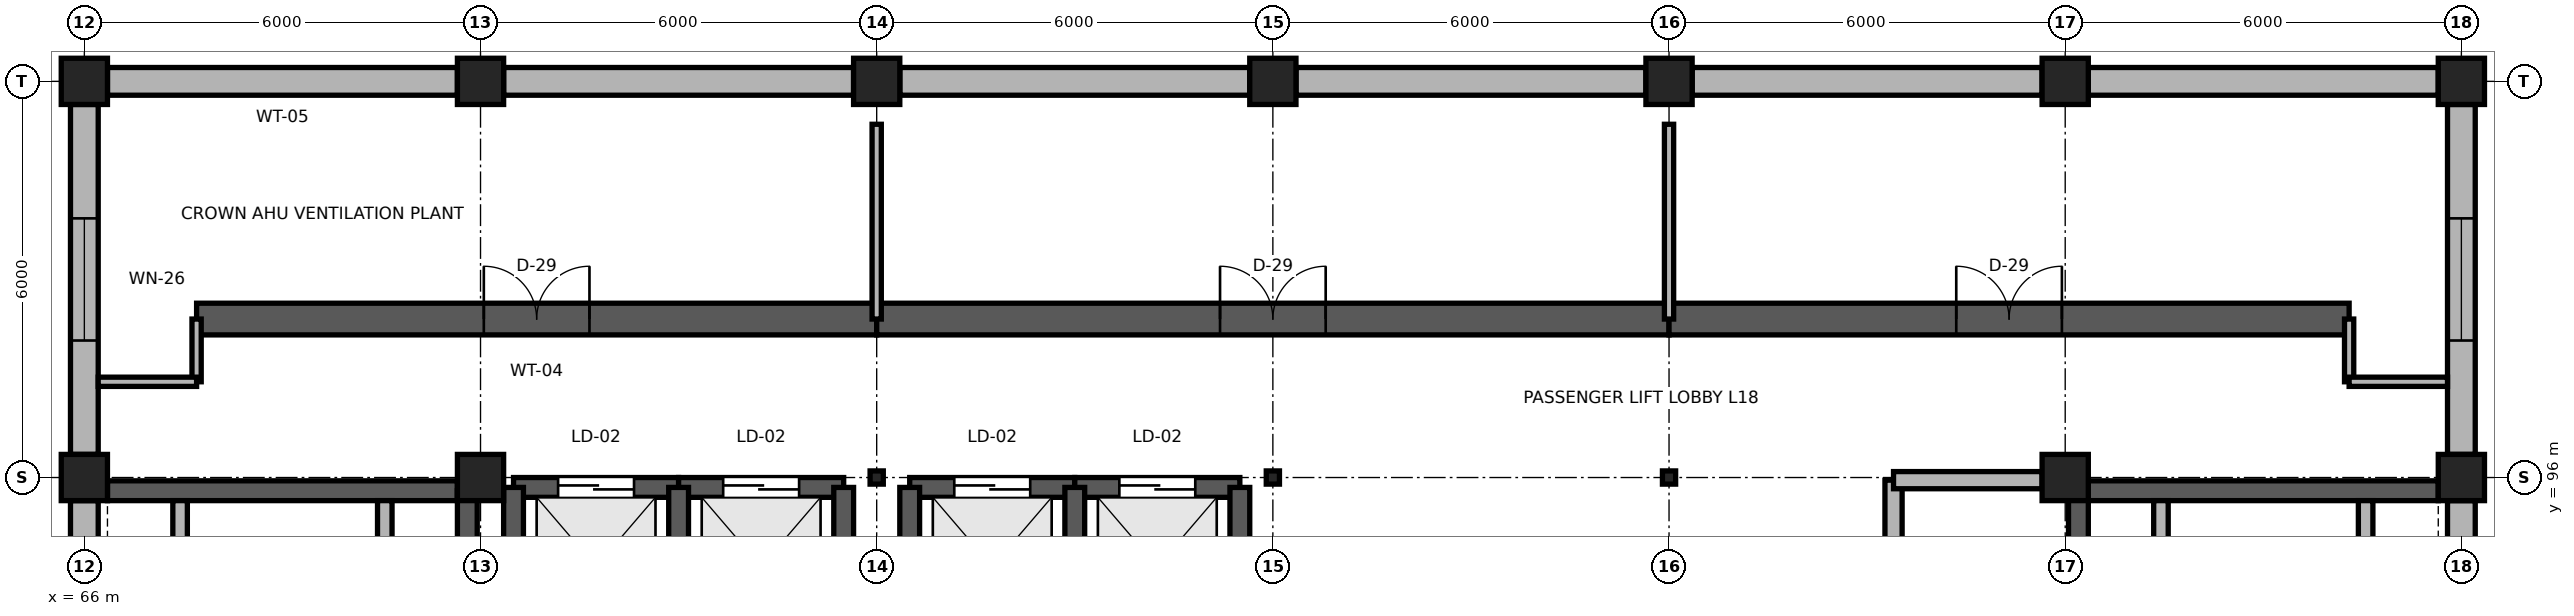
"""IFC4 building model, lengths in metres.
Left out: names, types, materials, properties, quantities, classifications, styles, units other than length and angle.
Written with IfcOpenShell. Run it as: python <this file> out.ifc"""

import sys

from ifc_helpers import new_model, si_unit, direction, frame, frame_2d, origin, origin_2d, place, context, subcontext, project, spatial, rectangle, i_section, extrude, element, fill, save


model = new_model("IFC4")
c1 = context("Model", 3, precision=1e-05, world=origin(), true_north=direction((0.0, 1.0)))
c2 = subcontext(c1, "Body", "Model", "MODEL_VIEW")
j1 = project(units=[si_unit("LENGTHUNIT", "METRE"), si_unit("PLANEANGLEUNIT", "RADIAN")], contexts=[c1])
p1 = place(None, origin())
s1 = spatial("IfcSite", under=j1, at=p1, CompositionType="ELEMENT")
p2 = place(p1, origin())
s2 = spatial("IfcBuilding", under=s1, at=p2, CompositionType="ELEMENT")
p3 = place(p2, frame((0.0, 0.0, 72.0)))
s3 = spatial("IfcBuildingStorey", under=s2, at=p3, CompositionType="ELEMENT", Elevation=72.0)
for number, where, z_axis, x_axis in (
    (1, (66.0, 96.0, 0.0), (0.0, 0.0, 1.0), (1.0, 0.0, 0.0)),
    (2, (72.0, 96.0, 0.0), (0.0, 0.0, 1.0), (1.0, 0.0, 0.0)),
):
    element("IfcColumn", number, at=place(p3, frame(where, z_axis=z_axis, x_axis=x_axis)), inside=s3, PredefinedType="COLUMN", context=c2, shape_type="SweptSolid", body=[
        extrude(rectangle(XDim=0.7, YDim=0.7, at=origin_2d()), origin(), (0.0, 0.0, 1.0), 4.3),
    ])
for number, where, z_axis, x_axis in (
    (3, (78.0, 96.0, 0.0), (0.0, 0.0, 1.0), (1.0, 0.0, 0.0)),
    (4, (84.0, 96.0, 0.0), (0.0, 0.0, 1.0), (1.0, 0.0, 0.0)),
    (5, (90.0, 96.0, 0.0), (0.0, 0.0, 1.0), (1.0, 0.0, 0.0)),
):
    element("IfcColumn", number, at=place(p3, frame(where, z_axis=z_axis, x_axis=x_axis)), inside=s3, PredefinedType="COLUMN", context=c2, shape_type="SweptSolid", body=[
        extrude(i_section(OverallWidth=0.2, OverallDepth=0.2, WebThickness=0.008, FlangeThickness=0.012, FilletRadius=0.013, at=origin_2d()), origin(), (0.0, 0.0, 1.0), 4.3),
    ])
for number, where, z_axis, x_axis in (
    (6, (96.0, 96.0, 0.0), (0.0, 0.0, 1.0), (1.0, 0.0, 0.0)),
    (7, (102.0, 96.0, 0.0), (0.0, 0.0, 1.0), (1.0, 0.0, 0.0)),
    (8, (66.0, 102.0, 0.0), (0.0, 0.0, 1.0), (1.0, 0.0, 0.0)),
    (9, (72.0, 102.0, 0.0), (0.0, 0.0, 1.0), (1.0, 0.0, 0.0)),
    (10, (78.0, 102.0, 0.0), (0.0, 0.0, 1.0), (1.0, 0.0, 0.0)),
    (11, (84.0, 102.0, 0.0), (0.0, 0.0, 1.0), (1.0, 0.0, 0.0)),
    (12, (90.0, 102.0, 0.0), (0.0, 0.0, 1.0), (1.0, 0.0, 0.0)),
    (13, (96.0, 102.0, 0.0), (0.0, 0.0, 1.0), (1.0, 0.0, 0.0)),
    (14, (102.0, 102.0, 0.0), (0.0, 0.0, 1.0), (1.0, 0.0, 0.0)),
):
    element("IfcColumn", number, at=place(p3, frame(where, z_axis=z_axis, x_axis=x_axis)), inside=s3, PredefinedType="COLUMN", context=c2, shape_type="SweptSolid", body=[
        extrude(rectangle(XDim=0.7, YDim=0.7, at=origin_2d()), origin(), (0.0, 0.0, 1.0), 4.3),
    ])
for number, where, z_axis, x_axis in (
    (15, (66.35, 102.0, 0.0), (0.0, 0.0, 1.0), (1.0, 0.0, 0.0)),
    (16, (72.35, 102.0, 0.0), (0.0, 0.0, 1.0), (1.0, 0.0, 0.0)),
    (17, (78.35, 102.0, 0.0), (0.0, 0.0, 1.0), (1.0, 0.0, 0.0)),
    (18, (84.35, 102.0, 0.0), (0.0, 0.0, 1.0), (1.0, 0.0, 0.0)),
    (19, (90.35, 102.0, 0.0), (0.0, 0.0, 1.0), (1.0, 0.0, 0.0)),
    (20, (96.35, 102.0, 0.0), (0.0, 0.0, 1.0), (1.0, 0.0, 0.0)),
    (21, (66.0, 90.35, 0.0), (0.0, 0.0, 1.0), (0.0, 1.0, 0.0)),
):
    element("IfcWall", number, at=place(p3, frame(where, z_axis=z_axis, x_axis=x_axis)), inside=s3, PredefinedType="SOLIDWALL", context=c2, shape_type="SweptSolid", body=[
        extrude(rectangle(XDim=5.3, YDim=0.42, at=frame_2d((2.65, 0.0))), origin(), (0.0, 0.0, 1.0), 3.88),
    ])
p4 = place(p3, frame((66.0, 96.35, 0.0), z_axis=(0.0, 0.0, 1.0), x_axis=(0.0, 1.0, 0.0)))
e22 = element("IfcWall", 22, at=p4, inside=s3, PredefinedType="SOLIDWALL", context=c2, shape_type="SweptSolid", body=[
    extrude(rectangle(XDim=5.3, YDim=0.42, at=frame_2d((2.65, 0.0))), origin(), (0.0, 0.0, 1.0), 3.88),
])
p5 = place(p4, frame((1.725, 0.0, 0.85)))
e23 = element("IfcOpeningElement", 23, at=p5, cuts=e22, PredefinedType="OPENING", context=c2, shape_type="SweptSolid", body=[
    extrude(rectangle(XDim=1.85, YDim=2.55, at=frame_2d((0.925, 1.275))), frame((0.0, 0.225, 0.0), z_axis=(0.0, -1.0, 0.0), x_axis=(1.0, 0.0, 0.0)), (0.0, 0.0, 1.0), 0.45),
])
p6 = place(p3, frame((102.0, 90.35, 0.0), z_axis=(0.0, 0.0, 1.0), x_axis=(0.0, 1.0, 0.0)))
e24 = element("IfcWall", 24, at=p6, inside=s3, PredefinedType="SOLIDWALL", context=c2, shape_type="SweptSolid", body=[
    extrude(rectangle(XDim=5.3, YDim=0.42, at=frame_2d((2.65, 0.0))), origin(), (0.0, 0.0, 1.0), 3.88),
])
p7 = place(p3, frame((102.0, 96.35, 0.0), z_axis=(0.0, 0.0, 1.0), x_axis=(0.0, 1.0, 0.0)))
e25 = element("IfcWall", 25, at=p7, inside=s3, PredefinedType="SOLIDWALL", context=c2, shape_type="SweptSolid", body=[
    extrude(rectangle(XDim=5.3, YDim=0.42, at=frame_2d((2.65, 0.0))), origin(), (0.0, 0.0, 1.0), 3.88),
])
p8 = place(p7, frame((1.725, 0.0, 0.85)))
e26 = element("IfcOpeningElement", 26, at=p8, cuts=e25, PredefinedType="OPENING", context=c2, shape_type="SweptSolid", body=[
    extrude(rectangle(XDim=1.85, YDim=2.55, at=frame_2d((0.925, 1.275))), frame((0.0, 0.225, 0.0), z_axis=(0.0, -1.0, 0.0), x_axis=(1.0, 0.0, 0.0)), (0.0, 0.0, 1.0), 0.45),
])
p9 = place(p3, frame((66.35, 95.8, 0.0), z_axis=(0.0, 0.0, 1.0), x_axis=(1.0, 0.0, 0.0)))
e27 = element("IfcWall", 27, at=p9, inside=s3, PredefinedType="SHEAR", context=c2, shape_type="SweptSolid", body=[
    extrude(rectangle(XDim=5.3, YDim=0.3, at=frame_2d((2.65, 0.0))), origin(), (0.0, 0.0, 1.0), 4.3),
])
p10 = place(p3, frame((71.8, 84.0, 0.0), z_axis=(0.0, 0.0, 1.0), x_axis=(0.0, 1.0, 0.0)))
e28 = element("IfcWall", 28, at=p10, inside=s3, PredefinedType="SHEAR", context=c2, shape_type="SweptSolid", body=[
    extrude(rectangle(XDim=11.8, YDim=0.3, at=frame_2d((5.9, 0.0))), origin(), (0.0, 0.0, 1.0), 4.3),
])
for number, where, z_axis, x_axis in (
    (29, (67.45, 94.4, 0.0), (0.0, 0.0, 1.0), (0.0, 1.0, 0.0)),
    (30, (70.55, 94.4, 0.0), (0.0, 0.0, 1.0), (0.0, 1.0, 0.0)),
):
    element("IfcWall", number, at=place(p3, frame(where, z_axis=z_axis, x_axis=x_axis)), inside=s3, PredefinedType="PARTITIONING", context=c2, shape_type="SweptSolid", body=[
        extrude(rectangle(XDim=1.25, YDim=0.22, at=frame_2d((0.625, 0.0))), origin(), (0.0, 0.0, 1.0), 4.3),
    ])
p11 = place(p3, frame((96.35, 95.8, 0.0), z_axis=(0.0, 0.0, 1.0), x_axis=(1.0, 0.0, 0.0)))
e31 = element("IfcWall", 31, at=p11, inside=s3, PredefinedType="SHEAR", context=c2, shape_type="SweptSolid", body=[
    extrude(rectangle(XDim=5.3, YDim=0.3, at=frame_2d((2.65, 0.0))), origin(), (0.0, 0.0, 1.0), 4.3),
])
p12 = place(p3, frame((96.2, 84.0, 0.0), z_axis=(0.0, 0.0, 1.0), x_axis=(0.0, 1.0, 0.0)))
e32 = element("IfcWall", 32, at=p12, inside=s3, PredefinedType="SHEAR", context=c2, shape_type="SweptSolid", body=[
    extrude(rectangle(XDim=11.8, YDim=0.3, at=frame_2d((5.9, 0.0))), origin(), (0.0, 0.0, 1.0), 4.3),
])
for number, where, z_axis, x_axis in (
    (33, (97.45, 94.4, 0.0), (0.0, 0.0, 1.0), (0.0, 1.0, 0.0)),
    (34, (100.55, 94.4, 0.0), (0.0, 0.0, 1.0), (0.0, 1.0, 0.0)),
):
    element("IfcWall", number, at=place(p3, frame(where, z_axis=z_axis, x_axis=x_axis)), inside=s3, PredefinedType="PARTITIONING", context=c2, shape_type="SweptSolid", body=[
        extrude(rectangle(XDim=1.25, YDim=0.22, at=frame_2d((0.625, 0.0))), origin(), (0.0, 0.0, 1.0), 4.3),
    ])
p13 = place(p3, frame((72.5, 95.85, 0.0), z_axis=(0.0, 0.0, 1.0), x_axis=(1.0, 0.0, 0.0)))
e35 = element("IfcWall", 35, at=p13, inside=s3, PredefinedType="SHEAR", context=c2, shape_type="SweptSolid", body=[
    extrude(rectangle(XDim=2.5, YDim=0.3, at=frame_2d((1.25, 0.0))), origin(), (0.0, 0.0, 1.0), 4.3),
])
p14 = place(p13, frame((0.675, 0.0, 0.0)))
e36 = element("IfcOpeningElement", 36, at=p14, cuts=e35, PredefinedType="OPENING", context=c2, shape_type="SweptSolid", body=[
    extrude(rectangle(XDim=1.15, YDim=2.15, at=frame_2d((0.575, 1.075))), frame((0.0, 0.165, 0.0), z_axis=(0.0, -1.0, 0.0), x_axis=(1.0, 0.0, 0.0)), (0.0, 0.0, 1.0), 0.33),
])
p15 = place(p3, frame((72.5, 92.45, 0.0), z_axis=(0.0, 0.0, 1.0), x_axis=(0.0, 1.0, 0.0)))
e37 = element("IfcWall", 37, at=p15, inside=s3, PredefinedType="SHEAR", context=c2, shape_type="SweptSolid", body=[
    extrude(rectangle(XDim=3.4, YDim=0.3, at=frame_2d((1.7, 0.0))), origin(), (0.0, 0.0, 1.0), 4.3),
])
p16 = place(p3, frame((75.0, 95.85, 0.0), z_axis=(0.0, 0.0, 1.0), x_axis=(1.0, 0.0, 0.0)))
e38 = element("IfcWall", 38, at=p16, inside=s3, PredefinedType="SHEAR", context=c2, shape_type="SweptSolid", body=[
    extrude(rectangle(XDim=2.5, YDim=0.3, at=frame_2d((1.25, 0.0))), origin(), (0.0, 0.0, 1.0), 4.3),
])
p17 = place(p16, frame((0.675, 0.0, 0.0)))
e39 = element("IfcOpeningElement", 39, at=p17, cuts=e38, PredefinedType="OPENING", context=c2, shape_type="SweptSolid", body=[
    extrude(rectangle(XDim=1.15, YDim=2.15, at=frame_2d((0.575, 1.075))), frame((0.0, 0.165, 0.0), z_axis=(0.0, -1.0, 0.0), x_axis=(1.0, 0.0, 0.0)), (0.0, 0.0, 1.0), 0.33),
])
for number, where, z_axis, x_axis in (
    (40, (75.0, 92.45, 0.0), (0.0, 0.0, 1.0), (0.0, 1.0, 0.0)),
    (41, (77.5, 92.45, 0.0), (0.0, 0.0, 1.0), (0.0, 1.0, 0.0)),
):
    element("IfcWall", number, at=place(p3, frame(where, z_axis=z_axis, x_axis=x_axis)), inside=s3, PredefinedType="SHEAR", context=c2, shape_type="SweptSolid", body=[
        extrude(rectangle(XDim=3.4, YDim=0.3, at=frame_2d((1.7, 0.0))), origin(), (0.0, 0.0, 1.0), 4.3),
    ])
p18 = place(p3, frame((78.5, 95.85, 0.0), z_axis=(0.0, 0.0, 1.0), x_axis=(1.0, 0.0, 0.0)))
e42 = element("IfcWall", 42, at=p18, inside=s3, PredefinedType="SHEAR", context=c2, shape_type="SweptSolid", body=[
    extrude(rectangle(XDim=2.5, YDim=0.3, at=frame_2d((1.25, 0.0))), origin(), (0.0, 0.0, 1.0), 4.3),
])
p19 = place(p18, frame((0.675, 0.0, 0.0)))
e43 = element("IfcOpeningElement", 43, at=p19, cuts=e42, PredefinedType="OPENING", context=c2, shape_type="SweptSolid", body=[
    extrude(rectangle(XDim=1.15, YDim=2.15, at=frame_2d((0.575, 1.075))), frame((0.0, 0.165, 0.0), z_axis=(0.0, -1.0, 0.0), x_axis=(1.0, 0.0, 0.0)), (0.0, 0.0, 1.0), 0.33),
])
p20 = place(p3, frame((78.5, 92.45, 0.0), z_axis=(0.0, 0.0, 1.0), x_axis=(0.0, 1.0, 0.0)))
e44 = element("IfcWall", 44, at=p20, inside=s3, PredefinedType="SHEAR", context=c2, shape_type="SweptSolid", body=[
    extrude(rectangle(XDim=3.4, YDim=0.3, at=frame_2d((1.7, 0.0))), origin(), (0.0, 0.0, 1.0), 4.3),
])
p21 = place(p3, frame((81.0, 95.85, 0.0), z_axis=(0.0, 0.0, 1.0), x_axis=(1.0, 0.0, 0.0)))
e45 = element("IfcWall", 45, at=p21, inside=s3, PredefinedType="SHEAR", context=c2, shape_type="SweptSolid", body=[
    extrude(rectangle(XDim=2.5, YDim=0.3, at=frame_2d((1.25, 0.0))), origin(), (0.0, 0.0, 1.0), 4.3),
])
p22 = place(p21, frame((0.675, 0.0, 0.0)))
e46 = element("IfcOpeningElement", 46, at=p22, cuts=e45, PredefinedType="OPENING", context=c2, shape_type="SweptSolid", body=[
    extrude(rectangle(XDim=1.15, YDim=2.15, at=frame_2d((0.575, 1.075))), frame((0.0, 0.165, 0.0), z_axis=(0.0, -1.0, 0.0), x_axis=(1.0, 0.0, 0.0)), (0.0, 0.0, 1.0), 0.33),
])
for number, where, z_axis, x_axis in (
    (47, (81.0, 92.45, 0.0), (0.0, 0.0, 1.0), (0.0, 1.0, 0.0)),
    (48, (83.5, 92.45, 0.0), (0.0, 0.0, 1.0), (0.0, 1.0, 0.0)),
):
    element("IfcWall", number, at=place(p3, frame(where, z_axis=z_axis, x_axis=x_axis)), inside=s3, PredefinedType="SHEAR", context=c2, shape_type="SweptSolid", body=[
        extrude(rectangle(XDim=3.4, YDim=0.3, at=frame_2d((1.7, 0.0))), origin(), (0.0, 0.0, 1.0), 4.3),
    ])
p23 = place(p3, frame((93.4, 84.0, 0.0), z_axis=(0.0, 0.0, 1.0), x_axis=(0.0, 1.0, 0.0)))
e49 = element("IfcWall", 49, at=p23, inside=s3, PredefinedType="PARTITIONING", context=c2, shape_type="SweptSolid", body=[
    extrude(rectangle(XDim=11.96, YDim=0.26, at=frame_2d((5.98, 0.0))), origin(), (0.0, 0.0, 1.0), 4.3),
])
p24 = place(p23, frame((3.425, 0.0, 0.0)))
e50 = element("IfcOpeningElement", 50, at=p24, cuts=e49, PredefinedType="OPENING", context=c2, shape_type="SweptSolid", body=[
    extrude(rectangle(XDim=1.15, YDim=2.2, at=frame_2d((0.575, 1.1))), frame((0.0, 0.145, 0.0), z_axis=(0.0, -1.0, 0.0), x_axis=(1.0, 0.0, 0.0)), (0.0, 0.0, 1.0), 0.29),
])
p25 = place(p3, frame((93.4, 95.96, 0.0), z_axis=(0.0, 0.0, 1.0), x_axis=(1.0, 0.0, 0.0)))
e51 = element("IfcWall", 51, at=p25, inside=s3, PredefinedType="PARTITIONING", context=c2, shape_type="SweptSolid", body=[
    extrude(rectangle(XDim=2.25, YDim=0.26, at=frame_2d((1.125, 0.0))), origin(), (0.0, 0.0, 1.0), 4.056),
])
p26 = place(p3, frame((67.7, 98.4, 0.0), z_axis=(0.0, 0.0, 1.0), x_axis=(1.0, 0.0, 0.0)))
e52 = element("IfcWall", 52, at=p26, inside=s3, PredefinedType="SHEAR", context=c2, shape_type="SweptSolid", body=[
    extrude(rectangle(XDim=10.3, YDim=0.48, at=frame_2d((5.15, 0.0))), origin(), (0.0, 0.0, 1.0), 4.3),
])
p27 = place(p26, frame((4.35, 0.0, 0.0)))
e53 = element("IfcOpeningElement", 53, at=p27, cuts=e52, PredefinedType="OPENING", context=c2, shape_type="SweptSolid", body=[
    extrude(rectangle(XDim=1.6, YDim=2.25, at=frame_2d((0.8, 1.125))), frame((0.0, 0.255, 0.0), z_axis=(0.0, -1.0, 0.0), x_axis=(1.0, 0.0, 0.0)), (0.0, 0.0, 1.0), 0.51),
])
p28 = place(p3, frame((78.0, 98.4, 0.0), z_axis=(0.0, 0.0, 1.0), x_axis=(1.0, 0.0, 0.0)))
e54 = element("IfcWall", 54, at=p28, inside=s3, PredefinedType="SHEAR", context=c2, shape_type="SweptSolid", body=[
    extrude(rectangle(XDim=12.0, YDim=0.48, at=frame_2d((6.0, 0.0))), origin(), (0.0, 0.0, 1.0), 4.3),
])
p29 = place(p28, frame((5.2, 0.0, 0.0)))
e55 = element("IfcOpeningElement", 55, at=p29, cuts=e54, PredefinedType="OPENING", context=c2, shape_type="SweptSolid", body=[
    extrude(rectangle(XDim=1.6, YDim=2.25, at=frame_2d((0.8, 1.125))), frame((0.0, 0.255, 0.0), z_axis=(0.0, -1.0, 0.0), x_axis=(1.0, 0.0, 0.0)), (0.0, 0.0, 1.0), 0.51),
])
p30 = place(p3, frame((90.0, 98.4, 0.0), z_axis=(0.0, 0.0, 1.0), x_axis=(1.0, 0.0, 0.0)))
e56 = element("IfcWall", 56, at=p30, inside=s3, PredefinedType="SHEAR", context=c2, shape_type="SweptSolid", body=[
    extrude(rectangle(XDim=10.3, YDim=0.48, at=frame_2d((5.15, 0.0))), origin(), (0.0, 0.0, 1.0), 4.3),
])
p31 = place(p30, frame((4.35, 0.0, 0.0)))
e57 = element("IfcOpeningElement", 57, at=p31, cuts=e56, PredefinedType="OPENING", context=c2, shape_type="SweptSolid", body=[
    extrude(rectangle(XDim=1.6, YDim=2.25, at=frame_2d((0.8, 1.125))), frame((0.0, 0.255, 0.0), z_axis=(0.0, -1.0, 0.0), x_axis=(1.0, 0.0, 0.0)), (0.0, 0.0, 1.0), 0.51),
])
for number, where, z_axis, x_axis in (
    (58, (78.0, 98.4, 0.0), (0.0, 0.0, 1.0), (0.0, 1.0, 0.0)),
    (59, (90.0, 98.4, 0.0), (0.0, 0.0, 1.0), (0.0, 1.0, 0.0)),
):
    element("IfcWall", number, at=place(p3, frame(where, z_axis=z_axis, x_axis=x_axis)), inside=s3, PredefinedType="PARTITIONING", context=c2, shape_type="SweptSolid", body=[
        extrude(rectangle(XDim=2.95, YDim=0.14, at=frame_2d((1.475, 0.0))), origin(), (0.0, 0.0, 1.0), 4.056),
    ])
p32 = place(p3, frame((67.7, 98.4, 0.0), z_axis=(0.0, 0.0, 1.0), x_axis=(0.0, -1.0, 0.0)))
e60 = element("IfcWall", 60, at=p32, inside=s3, PredefinedType="PARTITIONING", context=c2, shape_type="SweptSolid", body=[
    extrude(rectangle(XDim=0.95, YDim=0.14, at=frame_2d((0.475, 0.0))), origin(), (0.0, 0.0, 1.0), 4.3),
])
p33 = place(p3, frame((67.7, 97.45, 0.0), z_axis=(0.0, 0.0, 1.0), x_axis=(-1.0, 0.0, 0.0)))
e61 = element("IfcWall", 61, at=p33, inside=s3, PredefinedType="PARTITIONING", context=c2, shape_type="SweptSolid", body=[
    extrude(rectangle(XDim=1.49, YDim=0.14, at=frame_2d((0.745, 0.0))), origin(), (0.0, 0.0, 1.0), 4.3),
])
p34 = place(p3, frame((100.3, 98.4, 0.0), z_axis=(0.0, 0.0, 1.0), x_axis=(0.0, -1.0, 0.0)))
e62 = element("IfcWall", 62, at=p34, inside=s3, PredefinedType="PARTITIONING", context=c2, shape_type="SweptSolid", body=[
    extrude(rectangle(XDim=0.95, YDim=0.14, at=frame_2d((0.475, 0.0))), origin(), (0.0, 0.0, 1.0), 4.3),
])
p35 = place(p3, frame((100.3, 97.45, 0.0), z_axis=(0.0, 0.0, 1.0), x_axis=(1.0, 0.0, 0.0)))
e63 = element("IfcWall", 63, at=p35, inside=s3, PredefinedType="PARTITIONING", context=c2, shape_type="SweptSolid", body=[
    extrude(rectangle(XDim=1.49, YDim=0.14, at=frame_2d((0.745, 0.0))), origin(), (0.0, 0.0, 1.0), 4.3),
])
p36 = place(p5, origin())
e64 = element("IfcWindow", 64, at=p36, inside=s3, PartitioningType="SINGLE_PANEL", PredefinedType="WINDOW", context=c2, shape_type="SweptSolid", body=[
    extrude(rectangle(XDim=1.85, YDim=2.55, at=frame_2d((0.925, 1.275))), frame((0.0, 0.03, 0.0), z_axis=(0.0, -1.0, 0.0), x_axis=(1.0, 0.0, 0.0)), (0.0, 0.0, 1.0), 0.06),
])
fill(e23, e64)
p37 = place(p8, origin())
e65 = element("IfcWindow", 65, at=p37, inside=s3, PartitioningType="SINGLE_PANEL", PredefinedType="WINDOW", context=c2, shape_type="SweptSolid", body=[
    extrude(rectangle(XDim=1.85, YDim=2.55, at=frame_2d((0.925, 1.275))), frame((0.0, 0.03, 0.0), z_axis=(0.0, -1.0, 0.0), x_axis=(1.0, 0.0, 0.0)), (0.0, 0.0, 1.0), 0.06),
])
fill(e26, e65)
p38 = place(p14, origin())
e66 = element("IfcDoor", 66, at=p38, inside=s3, OperationType="DOUBLE_DOOR_SLIDING", PredefinedType="DOOR", context=c2, shape_type="SweptSolid", body=[
    extrude(rectangle(XDim=1.15, YDim=2.15, at=frame_2d((0.575, 1.075))), frame((0.0, 0.025, 0.0), z_axis=(0.0, -1.0, 0.0), x_axis=(1.0, 0.0, 0.0)), (0.0, 0.0, 1.0), 0.05),
])
fill(e36, e66)
p39 = place(p17, origin())
e67 = element("IfcDoor", 67, at=p39, inside=s3, OperationType="DOUBLE_DOOR_SLIDING", PredefinedType="DOOR", context=c2, shape_type="SweptSolid", body=[
    extrude(rectangle(XDim=1.15, YDim=2.15, at=frame_2d((0.575, 1.075))), frame((0.0, 0.025, 0.0), z_axis=(0.0, -1.0, 0.0), x_axis=(1.0, 0.0, 0.0)), (0.0, 0.0, 1.0), 0.05),
])
fill(e39, e67)
p40 = place(p19, origin())
e68 = element("IfcDoor", 68, at=p40, inside=s3, OperationType="DOUBLE_DOOR_SLIDING", PredefinedType="DOOR", context=c2, shape_type="SweptSolid", body=[
    extrude(rectangle(XDim=1.15, YDim=2.15, at=frame_2d((0.575, 1.075))), frame((0.0, 0.025, 0.0), z_axis=(0.0, -1.0, 0.0), x_axis=(1.0, 0.0, 0.0)), (0.0, 0.0, 1.0), 0.05),
])
fill(e43, e68)
p41 = place(p22, origin())
e69 = element("IfcDoor", 69, at=p41, inside=s3, OperationType="DOUBLE_DOOR_SLIDING", PredefinedType="DOOR", context=c2, shape_type="SweptSolid", body=[
    extrude(rectangle(XDim=1.15, YDim=2.15, at=frame_2d((0.575, 1.075))), frame((0.0, 0.025, 0.0), z_axis=(0.0, -1.0, 0.0), x_axis=(1.0, 0.0, 0.0)), (0.0, 0.0, 1.0), 0.05),
])
fill(e46, e69)
p42 = place(p27, origin())
e70 = element("IfcDoor", 70, at=p42, inside=s3, OperationType="DOUBLE_DOOR_SINGLE_SWING", PredefinedType="DOOR", context=c2, shape_type="SweptSolid", body=[
    extrude(rectangle(XDim=1.6, YDim=2.25, at=frame_2d((0.8, 1.125))), frame((0.0, 0.025, 0.0), z_axis=(0.0, -1.0, 0.0), x_axis=(1.0, 0.0, 0.0)), (0.0, 0.0, 1.0), 0.05),
])
fill(e53, e70)
p43 = place(p29, origin())
e71 = element("IfcDoor", 71, at=p43, inside=s3, OperationType="DOUBLE_DOOR_SINGLE_SWING", PredefinedType="DOOR", context=c2, shape_type="SweptSolid", body=[
    extrude(rectangle(XDim=1.6, YDim=2.25, at=frame_2d((0.8, 1.125))), frame((0.0, 0.025, 0.0), z_axis=(0.0, -1.0, 0.0), x_axis=(1.0, 0.0, 0.0)), (0.0, 0.0, 1.0), 0.05),
])
fill(e55, e71)
p44 = place(p31, origin())
e72 = element("IfcDoor", 72, at=p44, inside=s3, OperationType="DOUBLE_DOOR_SINGLE_SWING", PredefinedType="DOOR", context=c2, shape_type="SweptSolid", body=[
    extrude(rectangle(XDim=1.6, YDim=2.25, at=frame_2d((0.8, 1.125))), frame((0.0, 0.025, 0.0), z_axis=(0.0, -1.0, 0.0), x_axis=(1.0, 0.0, 0.0)), (0.0, 0.0, 1.0), 0.05),
])
fill(e57, e72)
save(model, sys.argv[1])
